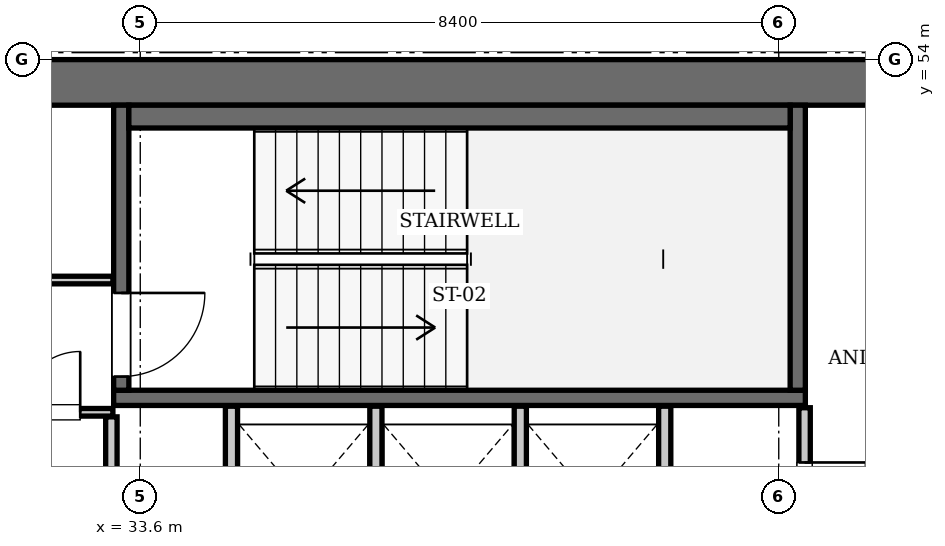
"""IFC4 building model, lengths in metres.
Left out: names, types, materials, properties, quantities, classifications, styles, units other than length and angle.
Written with IfcOpenShell. Run it as: python <this file> out.ifc"""

import sys

from ifc_helpers import new_model, si_unit, direction, frame, frame_2d, origin, place, context, subcontext, project, spatial, rectangle, extrude, element, fill, save


model = new_model("IFC4")
c1 = context("Model", 3, precision=1e-05, world=origin(), true_north=direction((0.0, 1.0)))
c2 = subcontext(c1, "Body", "Model", "MODEL_VIEW")
j1 = project(units=[si_unit("LENGTHUNIT", "METRE"), si_unit("PLANEANGLEUNIT", "RADIAN")], contexts=[c1])
p1 = place(None, origin())
s1 = spatial("IfcSite", under=j1, at=p1, CompositionType="ELEMENT")
p2 = place(p1, origin())
s2 = spatial("IfcBuilding", under=s1, at=p2, CompositionType="ELEMENT")
p3 = place(p2, frame((0.0, 0.0, 312.55)))
s3 = spatial("IfcBuildingStorey", under=s2, at=p3, CompositionType="ELEMENT", Elevation=312.55)
p4 = place(p3, frame((25.2, 53.7, 0.0), z_axis=(0.0, 0.0, 1.0), x_axis=(1.0, 0.0, 0.0)))
e1 = element("IfcWall", 1, at=p4, inside=s3, PredefinedType="SHEAR", context=c2, shape_type="SweptSolid", body=[
    extrude(rectangle(XDim=25.2, YDim=0.6, at=frame_2d((12.6, 0.0))), origin(), (0.0, 0.0, 1.0), 3.85),
])
p5 = place(p3, frame((33.25, 49.55, 0.0), z_axis=(0.0, 0.0, 1.0), x_axis=(1.0, 0.0, 0.0)))
e2 = element("IfcWall", 2, at=p5, inside=s3, PredefinedType="SOLIDWALL", context=c2, shape_type="SweptSolid", body=[
    extrude(rectangle(XDim=9.1, YDim=0.2, at=frame_2d((4.55, 0.0))), origin(), (0.0, 0.0, 1.0), 3.55),
])
p6 = place(p3, frame((42.25, 49.65, 0.0), z_axis=(0.0, 0.0, 1.0), x_axis=(0.0, 1.0, 0.0)))
e3 = element("IfcWall", 3, at=p6, inside=s3, PredefinedType="SOLIDWALL", context=c2, shape_type="SweptSolid", body=[
    extrude(rectangle(XDim=3.75, YDim=0.2, at=frame_2d((1.875, 0.0))), origin(), (0.0, 0.0, 1.0), 3.55),
])
p7 = place(p3, frame((33.35, 49.65, 0.0), z_axis=(0.0, 0.0, 1.0), x_axis=(0.0, 1.0, 0.0)))
e4 = element("IfcWall", 4, at=p7, inside=s3, PredefinedType="SOLIDWALL", context=c2, shape_type="SweptSolid", body=[
    extrude(rectangle(XDim=3.75, YDim=0.2, at=frame_2d((1.875, 0.0))), origin(), (0.0, 0.0, 1.0), 3.55),
])
p8 = place(p7, frame((0.18, 0.0, 0.0)))
e5 = element("IfcOpeningElement", 5, at=p8, cuts=e4, PredefinedType="OPENING", context=c2, shape_type="SweptSolid", body=[
    extrude(rectangle(XDim=1.1, YDim=2.15, at=frame_2d((0.55, 1.075))), frame((0.0, 0.11, 0.0), z_axis=(0.0, -1.0, 0.0), x_axis=(1.0, 0.0, 0.0)), (0.0, 0.0, 1.0), 0.22),
])
p9 = place(p3, frame((33.45, 53.25, 0.0), z_axis=(0.0, 0.0, 1.0), x_axis=(1.0, 0.0, 0.0)))
e6 = element("IfcWall", 6, at=p9, inside=s3, PredefinedType="SOLIDWALL", context=c2, shape_type="SweptSolid", body=[
    extrude(rectangle(XDim=8.7, YDim=0.3, at=frame_2d((4.35, 0.0))), origin(), (0.0, 0.0, 1.0), 3.55),
])
for number, where, z_axis, x_axis in (
    (7, (34.8, 47.25, 0.0), (0.0, 0.0, 1.0), (0.0, 1.0, 0.0)),
    (8, (36.7, 47.25, 0.0), (0.0, 0.0, 1.0), (0.0, 1.0, 0.0)),
    (9, (38.6, 47.25, 0.0), (0.0, 0.0, 1.0), (0.0, 1.0, 0.0)),
    (10, (40.5, 47.25, 0.0), (0.0, 0.0, 1.0), (0.0, 1.0, 0.0)),
):
    element("IfcWall", number, at=place(p3, frame(where, z_axis=z_axis, x_axis=x_axis)), inside=s3, PredefinedType="SOLIDWALL", context=c2, shape_type="SweptSolid", body=[
        extrude(rectangle(XDim=2.19, YDim=0.16, at=frame_2d((1.095, 0.0))), origin(), (0.0, 0.0, 1.0), 3.55),
    ])
p10 = place(p3, frame((33.22, 45.14, 0.0), z_axis=(0.0, 0.0, 1.0), x_axis=(0.0, 1.0, 0.0)))
e11 = element("IfcWall", 11, at=p10, inside=s3, PredefinedType="PARTITIONING", context=c2, shape_type="SweptSolid", body=[
    extrude(rectangle(XDim=4.16, YDim=0.15, at=frame_2d((2.08, 0.0))), origin(), (0.0, 0.0, 1.0), 3.55),
])
p11 = place(p3, frame((30.06, 49.36, 0.0), z_axis=(0.0, 0.0, 1.0), x_axis=(1.0, 0.0, 0.0)))
e12 = element("IfcWall", 12, at=p11, inside=s3, PredefinedType="PARTITIONING", context=c2, shape_type="SweptSolid", body=[
    extrude(rectangle(XDim=3.18, YDim=0.1, at=frame_2d((1.59, 0.0))), origin(), (0.0, 0.0, 1.0), 3.55),
])
p12 = place(p11, frame((1.95, 0.0, 0.0)))
e13 = element("IfcOpeningElement", 13, at=p12, cuts=e12, PredefinedType="OPENING", context=c2, shape_type="SweptSolid", body=[
    extrude(rectangle(XDim=0.8, YDim=2.05, at=frame_2d((0.4, 1.025))), frame((0.0, 0.06, 0.0), z_axis=(0.0, -1.0, 0.0), x_axis=(1.0, 0.0, 0.0)), (0.0, 0.0, 1.0), 0.12),
])
p13 = place(p3, frame((31.82, 51.1, 0.0), z_axis=(0.0, 0.0, 1.0), x_axis=(1.0, 0.0, 0.0)))
e14 = element("IfcWall", 14, at=p13, inside=s3, PredefinedType="PARTITIONING", context=c2, shape_type="SweptSolid", body=[
    extrude(rectangle(XDim=1.42, YDim=0.1, at=frame_2d((0.71, 0.0))), origin(), (0.0, 0.0, 1.0), 3.55),
])
p14 = place(p3, frame((42.34, 47.66, 0.0), z_axis=(0.0, 0.0, 1.0), x_axis=(0.0, 1.0, 0.0)))
e15 = element("IfcWall", 15, at=p14, inside=s3, PredefinedType="PARTITIONING", context=c2, shape_type="SweptSolid", body=[
    extrude(rectangle(XDim=1.76, YDim=0.15, at=frame_2d((0.88, 0.0))), origin(), (0.0, 0.0, 1.0), 3.55),
])
p15 = place(p14, frame((0.24, 0.0, 0.0)))
e16 = element("IfcOpeningElement", 16, at=p15, cuts=e15, PredefinedType="OPENING", context=c2, shape_type="SweptSolid", body=[
    extrude(rectangle(XDim=0.8, YDim=2.05, at=frame_2d((0.4, 1.025))), frame((0.0, 0.085, 0.0), z_axis=(0.0, -1.0, 0.0), x_axis=(1.0, 0.0, 0.0)), (0.0, 0.0, 1.0), 0.17),
])
p16 = place(p8, frame((1.1, 0.0, 0.0), z_axis=(0.0, 0.0, 1.0), x_axis=(-1.0, 0.0, 0.0)))
e17 = element("IfcDoor", 17, at=p16, inside=s3, OperationType="SINGLE_SWING_LEFT", PredefinedType="DOOR", context=c2, shape_type="SweptSolid", body=[
    extrude(rectangle(XDim=1.1, YDim=2.15, at=frame_2d((0.55, 1.075))), frame((0.0, 0.025, 0.0), z_axis=(0.0, -1.0, 0.0), x_axis=(1.0, 0.0, 0.0)), (0.0, 0.0, 1.0), 0.05),
])
fill(e5, e17)
p17 = place(p12, origin())
e18 = element("IfcDoor", 18, at=p17, inside=s3, OperationType="SINGLE_SWING_RIGHT", PredefinedType="DOOR", context=c2, shape_type="SweptSolid", body=[
    extrude(rectangle(XDim=0.8, YDim=2.05, at=frame_2d((0.4, 1.025))), frame((0.0, 0.025, 0.0), z_axis=(0.0, -1.0, 0.0), x_axis=(1.0, 0.0, 0.0)), (0.0, 0.0, 1.0), 0.05),
])
fill(e13, e18)
p18 = place(p15, frame((0.8, 0.0, 0.0), z_axis=(0.0, 0.0, 1.0), x_axis=(-1.0, 0.0, 0.0)))
e19 = element("IfcDoor", 19, at=p18, inside=s3, OperationType="SINGLE_SWING_LEFT", PredefinedType="DOOR", context=c2, shape_type="SweptSolid", body=[
    extrude(rectangle(XDim=0.8, YDim=2.05, at=frame_2d((0.4, 1.025))), frame((0.0, 0.025, 0.0), z_axis=(0.0, -1.0, 0.0), x_axis=(1.0, 0.0, 0.0)), (0.0, 0.0, 1.0), 0.05),
])
fill(e16, e19)
save(model, sys.argv[1])
